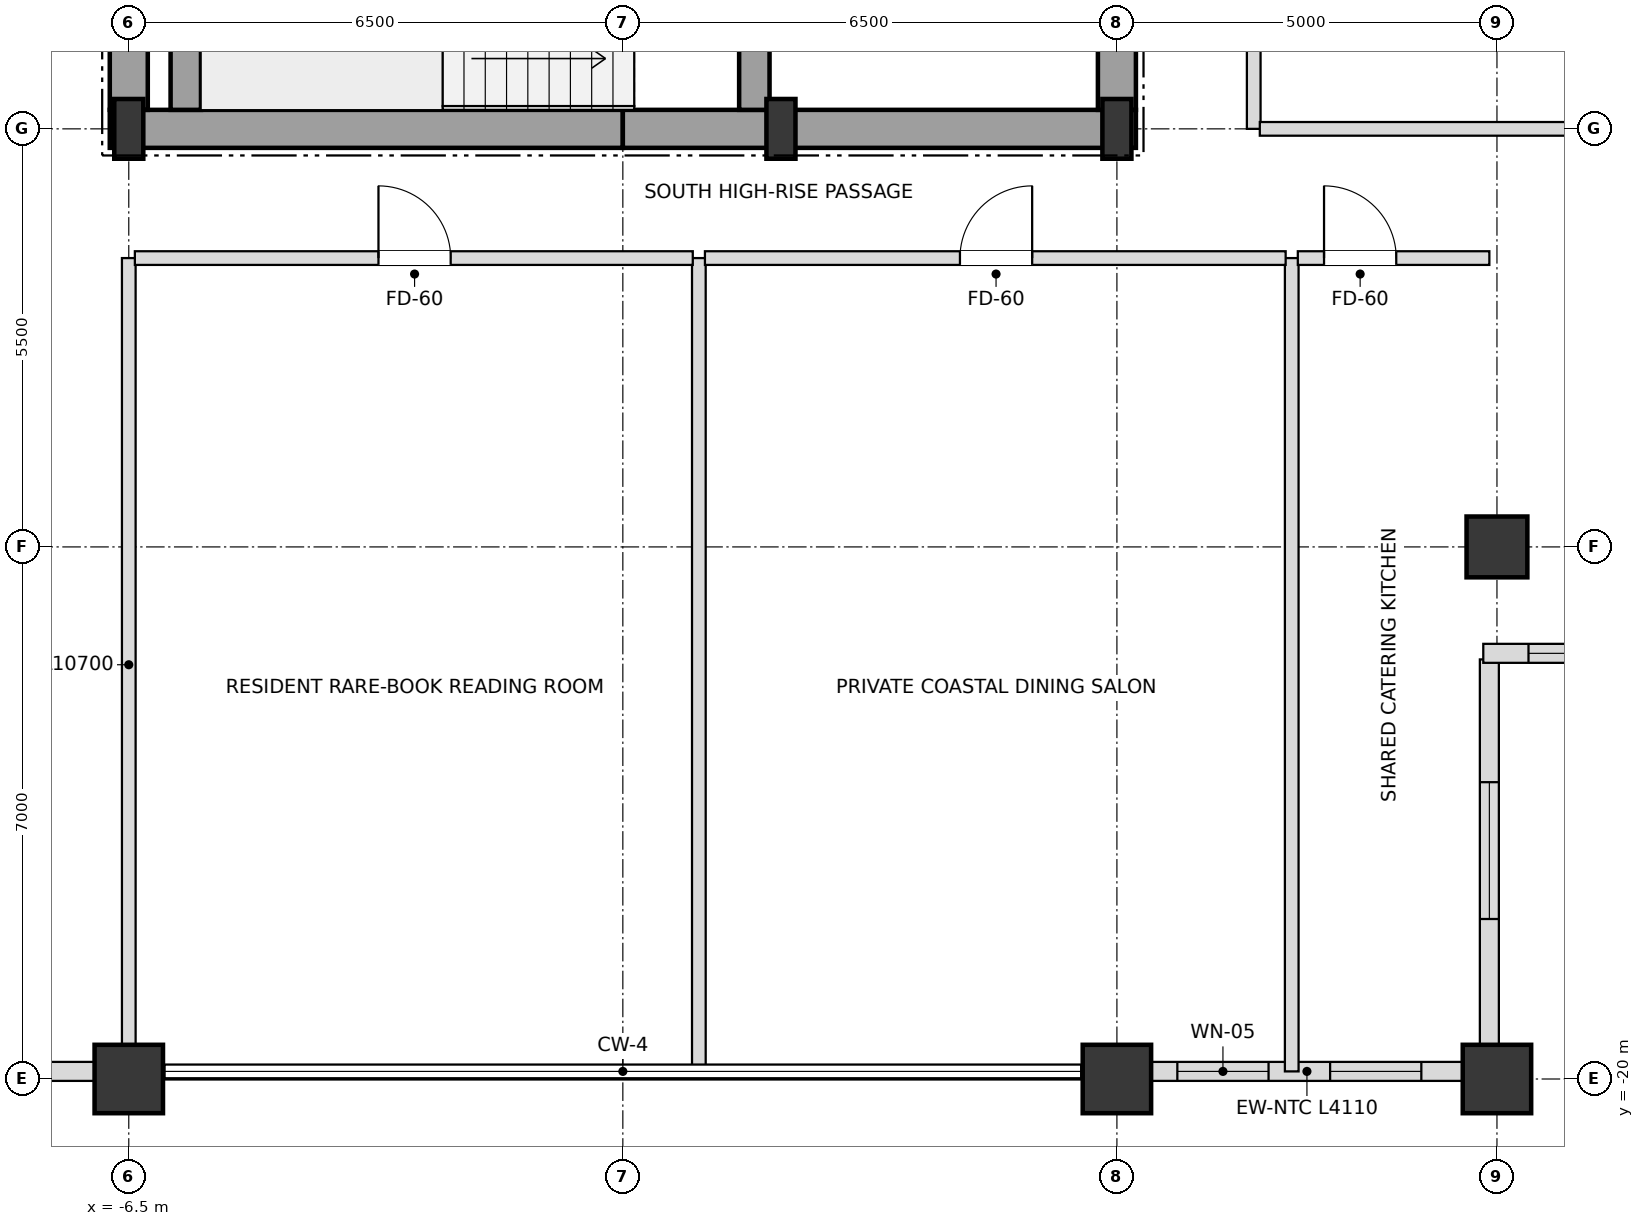
"""IFC4 building model, lengths in metres.
Left out: names, types, materials, properties, quantities, classifications, styles, units other than length and angle.
Written with IfcOpenShell. Run it as: python <this file> out.ifc"""

import sys

from ifc_helpers import new_model, si_unit, direction, frame, frame_2d, origin, origin_2d, place, context, subcontext, project, spatial, rectangle, i_section, extrude, element, fill, save


model = new_model("IFC4")
c1 = context("Model", 3, precision=1e-05, world=origin(), true_north=direction((0.0, 1.0)))
c2 = subcontext(c1, "Body", "Model", "MODEL_VIEW")
j1 = project(units=[si_unit("LENGTHUNIT", "METRE"), si_unit("PLANEANGLEUNIT", "RADIAN")], contexts=[c1])
p1 = place(None, origin())
s1 = spatial("IfcSite", under=j1, at=p1, CompositionType="ELEMENT")
p2 = place(p1, origin())
s2 = spatial("IfcBuilding", under=s1, at=p2, CompositionType="ELEMENT")
p3 = place(p2, frame((0.0, 0.0, 258.3)))
s3 = spatial("IfcBuildingStorey", under=s2, at=p3, CompositionType="ELEMENT", Elevation=258.3)
for number, where, z_axis, x_axis in (
    (1, (-6.5, -7.5, 0.0), (0.0, 0.0, 1.0), (1.0, 0.0, 0.0)),
    (2, (2.08, -7.5, 0.0), (0.0, 0.0, 1.0), (1.0, 0.0, 0.0)),
    (3, (6.5, -7.5, 0.0), (0.0, 0.0, 1.0), (1.0, 0.0, 0.0)),
):
    element("IfcColumn", number, at=place(p3, frame(where, z_axis=z_axis, x_axis=x_axis)), inside=s3, PredefinedType="COLUMN", context=c2, shape_type="SweptSolid", body=[
        extrude(i_section(OverallWidth=0.382, OverallDepth=0.786, WebThickness=0.02, FlangeThickness=0.033, at=origin_2d()), origin(), (0.0, 0.0, 1.0), 3.6),
    ])
for number, where, z_axis, x_axis in (
    (4, (-6.5, -20.0, 0.0), (0.0, 0.0, 1.0), (1.0, 0.0, 0.0)),
    (5, (6.5, -20.0, 0.0), (0.0, 0.0, 1.0), (1.0, 0.0, 0.0)),
    (6, (11.5, -20.0, 0.0), (0.0, 0.0, 1.0), (1.0, 0.0, 0.0)),
):
    element("IfcColumn", number, at=place(p3, frame(where, z_axis=z_axis, x_axis=x_axis)), inside=s3, PredefinedType="USERDEFINED", context=c2, shape_type="SweptSolid", body=[
        extrude(rectangle(XDim=0.9, YDim=0.9, at=origin_2d()), origin(), (0.0, 0.0, 1.0), 3.6),
    ])
p4 = place(p3, frame((11.5, -13.0, 0.0), z_axis=(0.0, 0.0, 1.0), x_axis=(1.0, 0.0, 0.0)))
e7 = element("IfcColumn", 7, at=p4, inside=s3, PredefinedType="COLUMN", context=c2, shape_type="SweptSolid", body=[
    extrude(rectangle(XDim=0.8, YDim=0.8, at=origin_2d()), origin(), (0.0, 0.0, 1.0), 3.6),
])
p5 = place(p3, frame((-11.055, -19.9, 0.0), z_axis=(0.0, 0.0, 1.0), x_axis=(1.0, 0.0, 0.0)))
e8 = element("IfcWall", 8, at=p5, inside=s3, PredefinedType="SOLIDWALL", context=c2, shape_type="SweptSolid", body=[
    extrude(rectangle(XDim=4.11, YDim=0.25, at=frame_2d((2.055, 0.0))), origin(), (0.0, 0.0, 1.0), 2.748),
])
p6 = place(p5, frame((1.155, 0.0, 0.72)))
e9 = element("IfcOpeningElement", 9, at=p6, cuts=e8, PredefinedType="OPENING", context=c2, shape_type="SweptSolid", body=[
    extrude(rectangle(XDim=1.8, YDim=1.68, at=frame_2d((0.9, 0.84))), frame((0.0, 0.135, 0.0), z_axis=(0.0, -1.0, 0.0), x_axis=(1.0, 0.0, 0.0)), (0.0, 0.0, 1.0), 0.27),
])
p7 = place(p3, frame((6.945, -19.9, 0.0), z_axis=(0.0, 0.0, 1.0), x_axis=(1.0, 0.0, 0.0)))
e10 = element("IfcWall", 10, at=p7, inside=s3, PredefinedType="SOLIDWALL", context=c2, shape_type="SweptSolid", body=[
    extrude(rectangle(XDim=4.11, YDim=0.25, at=frame_2d((2.055, 0.0))), origin(), (0.0, 0.0, 1.0), 2.748),
])
p8 = place(p7, frame((0.35, 0.0, 0.72)))
e11 = element("IfcOpeningElement", 11, at=p8, cuts=e10, PredefinedType="OPENING", context=c2, shape_type="SweptSolid", body=[
    extrude(rectangle(XDim=1.2, YDim=1.68, at=frame_2d((0.6, 0.84))), frame((0.0, 0.135, 0.0), z_axis=(0.0, -1.0, 0.0), x_axis=(1.0, 0.0, 0.0)), (0.0, 0.0, 1.0), 0.27),
])
p9 = place(p7, frame((2.36, 0.0, 0.72)))
e12 = element("IfcOpeningElement", 12, at=p9, cuts=e10, PredefinedType="OPENING", context=c2, shape_type="SweptSolid", body=[
    extrude(rectangle(XDim=1.2, YDim=1.68, at=frame_2d((0.6, 0.84))), frame((0.0, 0.135, 0.0), z_axis=(0.0, -1.0, 0.0), x_axis=(1.0, 0.0, 0.0)), (0.0, 0.0, 1.0), 0.27),
])
p10 = place(p3, frame((11.4, -19.82, 0.0), z_axis=(0.0, 0.0, 1.0), x_axis=(0.0, 1.0, 0.0)))
e13 = element("IfcWall", 13, at=p10, inside=s3, PredefinedType="SOLIDWALL", context=c2, shape_type="SweptSolid", body=[
    extrude(rectangle(XDim=5.34, YDim=0.25, at=frame_2d((2.67, 0.0))), origin(), (0.0, 0.0, 1.0), 2.748),
])
p11 = place(p10, frame((1.925, 0.0, 0.72)))
e14 = element("IfcOpeningElement", 14, at=p11, cuts=e13, PredefinedType="OPENING", context=c2, shape_type="SweptSolid", body=[
    extrude(rectangle(XDim=1.8, YDim=1.68, at=frame_2d((0.9, 0.84))), frame((0.0, 0.135, 0.0), z_axis=(0.0, -1.0, 0.0), x_axis=(1.0, 0.0, 0.0)), (0.0, 0.0, 1.0), 0.27),
])
p12 = place(p3, frame((11.32, -14.4, 0.0), z_axis=(0.0, 0.0, 1.0), x_axis=(1.0, 0.0, 0.0)))
e15 = element("IfcWall", 15, at=p12, inside=s3, PredefinedType="SOLIDWALL", context=c2, shape_type="SweptSolid", body=[
    extrude(rectangle(XDim=5.66, YDim=0.25, at=frame_2d((2.83, 0.0))), origin(), (0.0, 0.0, 1.0), 2.748),
])
p13 = place(p12, frame((0.595, 0.0, 0.72)))
e16 = element("IfcOpeningElement", 16, at=p13, cuts=e15, PredefinedType="OPENING", context=c2, shape_type="SweptSolid", body=[
    extrude(rectangle(XDim=1.8, YDim=1.68, at=frame_2d((0.9, 0.84))), frame((0.0, 0.135, 0.0), z_axis=(0.0, -1.0, 0.0), x_axis=(1.0, 0.0, 0.0)), (0.0, 0.0, 1.0), 0.27),
])
p14 = place(p12, frame((3.265, 0.0, 0.72)))
e17 = element("IfcOpeningElement", 17, at=p14, cuts=e15, PredefinedType="OPENING", context=c2, shape_type="SweptSolid", body=[
    extrude(rectangle(XDim=1.8, YDim=1.68, at=frame_2d((0.9, 0.84))), frame((0.0, 0.135, 0.0), z_axis=(0.0, -1.0, 0.0), x_axis=(1.0, 0.0, 0.0)), (0.0, 0.0, 1.0), 0.27),
])
for number, where, z_axis, x_axis in (
    (18, (-6.75, -7.5, 0.0), (0.0, 0.0, 1.0), (1.0, 0.0, 0.0)),
    (19, (0.0, -7.5, 0.0), (0.0, 0.0, 1.0), (1.0, 0.0, 0.0)),
):
    element("IfcWall", number, at=place(p3, frame(where, z_axis=z_axis, x_axis=x_axis)), inside=s3, PredefinedType="SHEAR", context=c2, shape_type="SweptSolid", body=[
        extrude(rectangle(XDim=6.75, YDim=0.5, at=frame_2d((3.375, 0.0))), origin(), (0.0, 0.0, 1.0), 3.38),
    ])
p15 = place(p3, frame((-6.5, -7.25, 0.0), z_axis=(0.0, 0.0, 1.0), x_axis=(0.0, 1.0, 0.0)))
e20 = element("IfcWall", 20, at=p15, inside=s3, PredefinedType="SHEAR", context=c2, shape_type="SweptSolid", body=[
    extrude(rectangle(XDim=3.55, YDim=0.5, at=frame_2d((1.775, 0.0))), origin(), (0.0, 0.0, 1.0), 3.38),
])
p16 = place(p3, frame((6.5, -7.25, 0.0), z_axis=(0.0, 0.0, 1.0), x_axis=(0.0, 1.0, 0.0)))
e21 = element("IfcWall", 21, at=p16, inside=s3, PredefinedType="SHEAR", context=c2, shape_type="SweptSolid", body=[
    extrude(rectangle(XDim=5.75, YDim=0.5, at=frame_2d((2.875, 0.0))), origin(), (0.0, 0.0, 1.0), 3.38),
])
p17 = place(p16, frame((0.85, 0.0, 0.0)))
e22 = element("IfcOpeningElement", 22, at=p17, cuts=e21, PredefinedType="OPENING", context=c2, shape_type="SweptSolid", body=[
    extrude(rectangle(XDim=1.05, YDim=2.15, at=frame_2d((0.525, 1.075))), frame((0.0, 0.26, 0.0), z_axis=(0.0, -1.0, 0.0), x_axis=(1.0, 0.0, 0.0)), (0.0, 0.0, 1.0), 0.52),
])
p18 = place(p3, frame((-5.75, -7.25, 0.0), z_axis=(0.0, 0.0, 1.0), x_axis=(0.0, 1.0, 0.0)))
e23 = element("IfcWall", 23, at=p18, inside=s3, PredefinedType="SHEAR", context=c2, shape_type="SweptSolid", body=[
    extrude(rectangle(XDim=2.9, YDim=0.4, at=frame_2d((1.45, 0.0))), origin(), (0.0, 0.0, 1.0), 3.38),
])
p19 = place(p3, frame((1.73, -7.25, 0.0), z_axis=(0.0, 0.0, 1.0), x_axis=(0.0, 1.0, 0.0)))
e24 = element("IfcWall", 24, at=p19, inside=s3, PredefinedType="SHEAR", context=c2, shape_type="SweptSolid", body=[
    extrude(rectangle(XDim=3.3, YDim=0.4, at=frame_2d((1.65, 0.0))), origin(), (0.0, 0.0, 1.0), 3.38),
])
p20 = place(p19, frame((0.9, 0.0, 0.0)))
e25 = element("IfcOpeningElement", 25, at=p20, cuts=e24, PredefinedType="OPENING", context=c2, shape_type="SweptSolid", body=[
    extrude(rectangle(XDim=1.05, YDim=2.15, at=frame_2d((0.525, 1.075))), frame((0.0, 0.21, 0.0), z_axis=(0.0, -1.0, 0.0), x_axis=(1.0, 0.0, 0.0)), (0.0, 0.0, 1.0), 0.42),
])
p21 = place(p3, frame((-6.5, -19.9, 0.0), z_axis=(0.0, 0.0, 1.0), x_axis=(0.0, 1.0, 0.0)))
e26 = element("IfcWall", 26, at=p21, inside=s3, PredefinedType="PARTITIONING", context=c2, shape_type="SweptSolid", body=[
    extrude(rectangle(XDim=10.7, YDim=0.18, at=frame_2d((5.35, 0.0))), origin(), (0.0, 0.0, 1.0), 2.826),
])
p22 = place(p3, frame((1.0, -19.9, 0.0), z_axis=(0.0, 0.0, 1.0), x_axis=(0.0, 1.0, 0.0)))
e27 = element("IfcWall", 27, at=p22, inside=s3, PredefinedType="PARTITIONING", context=c2, shape_type="SweptSolid", body=[
    extrude(rectangle(XDim=10.7, YDim=0.18, at=frame_2d((5.35, 0.0))), origin(), (0.0, 0.0, 1.0), 3.018),
])
p23 = place(p3, frame((8.3, -7.5, 0.0), z_axis=(0.0, 0.0, 1.0), x_axis=(0.0, 1.0, 0.0)))
e28 = element("IfcWall", 28, at=p23, inside=s3, PredefinedType="PARTITIONING", context=c2, shape_type="SweptSolid", body=[
    extrude(rectangle(XDim=6.0, YDim=0.18, at=frame_2d((3.0, 0.0))), origin(), (0.0, 0.0, 1.0), 3.38),
])
p24 = place(p23, frame((1.425, 0.0, 0.0)))
e29 = element("IfcOpeningElement", 29, at=p24, cuts=e28, PredefinedType="OPENING", context=c2, shape_type="SweptSolid", body=[
    extrude(rectangle(XDim=0.95, YDim=2.15, at=frame_2d((0.475, 1.075))), frame((0.0, 0.1, 0.0), z_axis=(0.0, -1.0, 0.0), x_axis=(1.0, 0.0, 0.0)), (0.0, 0.0, 1.0), 0.2),
])
p25 = place(p3, frame((8.8, -19.9, 0.0), z_axis=(0.0, 0.0, 1.0), x_axis=(0.0, 1.0, 0.0)))
e30 = element("IfcWall", 30, at=p25, inside=s3, PredefinedType="PARTITIONING", context=c2, shape_type="SweptSolid", body=[
    extrude(rectangle(XDim=10.7, YDim=0.18, at=frame_2d((5.35, 0.0))), origin(), (0.0, 0.0, 1.0), 2.826),
])
p26 = place(p3, frame((-6.42, -9.2, 0.0), z_axis=(0.0, 0.0, 1.0), x_axis=(1.0, 0.0, 0.0)))
e31 = element("IfcWall", 31, at=p26, inside=s3, PredefinedType="PARTITIONING", context=c2, shape_type="SweptSolid", body=[
    extrude(rectangle(XDim=7.34, YDim=0.18, at=frame_2d((3.67, 0.0))), origin(), (0.0, 0.0, 1.0), 3.38),
])
p27 = place(p26, frame((3.205, 0.0, 0.0)))
e32 = element("IfcOpeningElement", 32, at=p27, cuts=e31, PredefinedType="OPENING", context=c2, shape_type="SweptSolid", body=[
    extrude(rectangle(XDim=0.95, YDim=2.15, at=frame_2d((0.475, 1.075))), frame((0.0, 0.1, 0.0), z_axis=(0.0, -1.0, 0.0), x_axis=(1.0, 0.0, 0.0)), (0.0, 0.0, 1.0), 0.2),
])
p28 = place(p3, frame((1.08, -9.2, 0.0), z_axis=(0.0, 0.0, 1.0), x_axis=(1.0, 0.0, 0.0)))
e33 = element("IfcWall", 33, at=p28, inside=s3, PredefinedType="PARTITIONING", context=c2, shape_type="SweptSolid", body=[
    extrude(rectangle(XDim=7.64, YDim=0.18, at=frame_2d((3.82, 0.0))), origin(), (0.0, 0.0, 1.0), 2.826),
])
p29 = place(p28, frame((3.355, 0.0, 0.0)))
e34 = element("IfcOpeningElement", 34, at=p29, cuts=e33, PredefinedType="OPENING", context=c2, shape_type="SweptSolid", body=[
    extrude(rectangle(XDim=0.95, YDim=2.15, at=frame_2d((0.475, 1.075))), frame((0.0, 0.1, 0.0), z_axis=(0.0, -1.0, 0.0), x_axis=(1.0, 0.0, 0.0)), (0.0, 0.0, 1.0), 0.2),
])
p30 = place(p3, frame((8.88, -9.2, 0.0), z_axis=(0.0, 0.0, 1.0), x_axis=(1.0, 0.0, 0.0)))
e35 = element("IfcWall", 35, at=p30, inside=s3, PredefinedType="PARTITIONING", context=c2, shape_type="SweptSolid", body=[
    extrude(rectangle(XDim=2.52, YDim=0.18, at=frame_2d((1.26, 0.0))), origin(), (0.0, 0.0, 1.0), 3.38),
])
p31 = place(p30, frame((0.345, 0.0, 0.0)))
e36 = element("IfcOpeningElement", 36, at=p31, cuts=e35, PredefinedType="OPENING", context=c2, shape_type="SweptSolid", body=[
    extrude(rectangle(XDim=0.95, YDim=2.15, at=frame_2d((0.475, 1.075))), frame((0.0, 0.1, 0.0), z_axis=(0.0, -1.0, 0.0), x_axis=(1.0, 0.0, 0.0)), (0.0, 0.0, 1.0), 0.2),
])
p32 = place(p3, frame((8.38, -7.5, 0.0), z_axis=(0.0, 0.0, 1.0), x_axis=(1.0, 0.0, 0.0)))
e37 = element("IfcWall", 37, at=p32, inside=s3, PredefinedType="PARTITIONING", context=c2, shape_type="SweptSolid", body=[
    extrude(rectangle(XDim=8.52, YDim=0.18, at=frame_2d((4.26, 0.0))), origin(), (0.0, 0.0, 1.0), 2.826),
])
p33 = place(p8, origin())
e38 = element("IfcWindow", 38, at=p33, inside=s3, PartitioningType="SINGLE_PANEL", PredefinedType="WINDOW", context=c2, shape_type="SweptSolid", body=[
    extrude(rectangle(XDim=1.2, YDim=1.68, at=frame_2d((0.6, 0.84))), frame((0.0, 0.03, 0.0), z_axis=(0.0, -1.0, 0.0), x_axis=(1.0, 0.0, 0.0)), (0.0, 0.0, 1.0), 0.06),
])
fill(e11, e38)
p34 = place(p9, origin())
e39 = element("IfcWindow", 39, at=p34, inside=s3, PartitioningType="SINGLE_PANEL", PredefinedType="WINDOW", context=c2, shape_type="SweptSolid", body=[
    extrude(rectangle(XDim=1.2, YDim=1.68, at=frame_2d((0.6, 0.84))), frame((0.0, 0.03, 0.0), z_axis=(0.0, -1.0, 0.0), x_axis=(1.0, 0.0, 0.0)), (0.0, 0.0, 1.0), 0.06),
])
fill(e12, e39)
p35 = place(p11, origin())
e40 = element("IfcWindow", 40, at=p35, inside=s3, PartitioningType="SINGLE_PANEL", PredefinedType="WINDOW", context=c2, shape_type="SweptSolid", body=[
    extrude(rectangle(XDim=1.8, YDim=1.68, at=frame_2d((0.9, 0.84))), frame((0.0, 0.03, 0.0), z_axis=(0.0, -1.0, 0.0), x_axis=(1.0, 0.0, 0.0)), (0.0, 0.0, 1.0), 0.06),
])
fill(e14, e40)
p36 = place(p13, origin())
e41 = element("IfcWindow", 41, at=p36, inside=s3, PartitioningType="SINGLE_PANEL", PredefinedType="WINDOW", context=c2, shape_type="SweptSolid", body=[
    extrude(rectangle(XDim=1.8, YDim=1.68, at=frame_2d((0.9, 0.84))), frame((0.0, 0.03, 0.0), z_axis=(0.0, -1.0, 0.0), x_axis=(1.0, 0.0, 0.0)), (0.0, 0.0, 1.0), 0.06),
])
fill(e16, e41)
p37 = place(p27, origin())
e42 = element("IfcDoor", 42, at=p37, inside=s3, OperationType="SINGLE_SWING_LEFT", PredefinedType="DOOR", context=c2, shape_type="SweptSolid", body=[
    extrude(rectangle(XDim=0.95, YDim=2.15, at=frame_2d((0.475, 1.075))), frame((0.0, 0.025, 0.0), z_axis=(0.0, -1.0, 0.0), x_axis=(1.0, 0.0, 0.0)), (0.0, 0.0, 1.0), 0.05),
])
fill(e32, e42)
p38 = place(p29, origin())
e43 = element("IfcDoor", 43, at=p38, inside=s3, OperationType="SINGLE_SWING_RIGHT", PredefinedType="DOOR", context=c2, shape_type="SweptSolid", body=[
    extrude(rectangle(XDim=0.95, YDim=2.15, at=frame_2d((0.475, 1.075))), frame((0.0, 0.025, 0.0), z_axis=(0.0, -1.0, 0.0), x_axis=(1.0, 0.0, 0.0)), (0.0, 0.0, 1.0), 0.05),
])
fill(e34, e43)
p39 = place(p31, origin())
e44 = element("IfcDoor", 44, at=p39, inside=s3, OperationType="SINGLE_SWING_LEFT", PredefinedType="DOOR", context=c2, shape_type="SweptSolid", body=[
    extrude(rectangle(XDim=0.95, YDim=2.15, at=frame_2d((0.475, 1.075))), frame((0.0, 0.025, 0.0), z_axis=(0.0, -1.0, 0.0), x_axis=(1.0, 0.0, 0.0)), (0.0, 0.0, 1.0), 0.05),
])
fill(e36, e44)
save(model, sys.argv[1])
